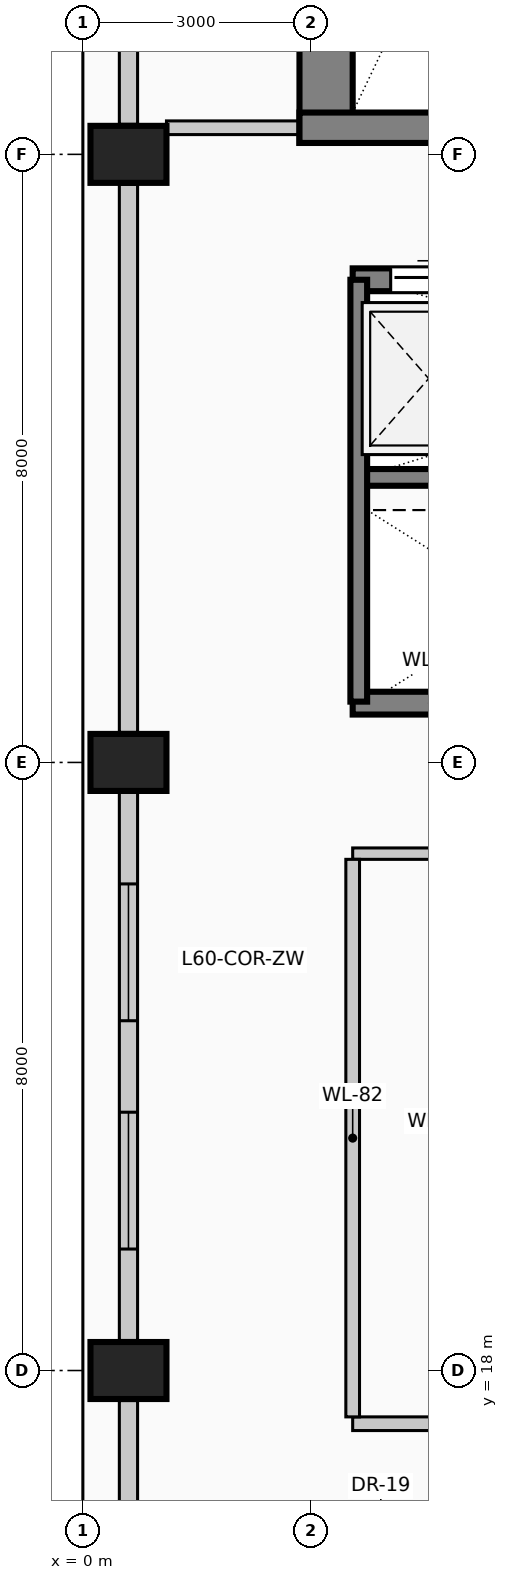
"""IFC4 building model, lengths in metres.
Left out: names, types, materials, properties, quantities, classifications, styles, units other than length and angle.
Written with IfcOpenShell. Run it as: python <this file> out.ifc"""

import sys

from ifc_helpers import new_model, si_unit, direction, frame, frame_2d, origin, origin_2d, place, context, subcontext, project, spatial, rectangle, extrude, element, fill, save


model = new_model("IFC4")
c1 = context("Model", 3, precision=1e-05, world=origin(), true_north=direction((0.0, 1.0)))
c2 = subcontext(c1, "Body", "Model", "MODEL_VIEW")
j1 = project(units=[si_unit("LENGTHUNIT", "METRE"), si_unit("PLANEANGLEUNIT", "RADIAN")], contexts=[c1])
p1 = place(None, origin())
s1 = spatial("IfcSite", under=j1, at=p1, CompositionType="ELEMENT")
p2 = place(p1, origin())
s2 = spatial("IfcBuilding", under=s1, at=p2, CompositionType="ELEMENT")
p3 = place(p2, frame((0.0, 0.0, 248.6)))
s3 = spatial("IfcBuildingStorey", under=s2, at=p3, CompositionType="ELEMENT", Elevation=248.6)
p4 = place(p3, frame((3.2, 34.15, 0.0), z_axis=(0.0, 0.0, 1.0), x_axis=(0.0, 1.0, 0.0)))
e1 = element("IfcWall", 1, at=p4, inside=s3, PredefinedType="SHEAR", context=c2, shape_type="SweptSolid", body=[
    extrude(rectangle(XDim=8.98, YDim=0.7, at=frame_2d((4.49, 0.0))), origin(), (0.0, 0.0, 1.0), 4.0),
])
p5 = place(p3, frame((2.85, 34.35, 0.0), z_axis=(0.0, 0.0, 1.0), x_axis=(1.0, 0.0, 0.0)))
e2 = element("IfcWall", 2, at=p5, inside=s3, PredefinedType="SHEAR", context=c2, shape_type="SweptSolid", body=[
    extrude(rectangle(XDim=4.86, YDim=0.4, at=frame_2d((2.43, 0.0))), origin(), (0.0, 0.0, 1.0), 4.0),
])
p6 = place(p5, frame((2.4, 0.0, 0.0)))
e3 = element("IfcOpeningElement", 3, at=p6, cuts=e2, PredefinedType="OPENING", context=c2, shape_type="SweptSolid", body=[
    extrude(rectangle(XDim=1.15, YDim=2.2, at=frame_2d((0.575, 1.1))), frame((0.0, 0.21, 0.0), z_axis=(0.0, -1.0, 0.0), x_axis=(1.0, 0.0, 0.0)), (0.0, 0.0, 1.0), 0.42),
])
for number, where, z_axis, x_axis in (
    (4, (0.6, 18.0, 0.0), (0.0, 0.0, 1.0), (0.0, 1.0, 0.0)),
    (5, (0.6, 26.0, 0.0), (0.0, 0.0, 1.0), (0.0, 1.0, 0.0)),
    (6, (0.6, 34.0, 0.0), (0.0, 0.0, 1.0), (0.0, 1.0, 0.0)),
):
    element("IfcColumn", number, at=place(p3, frame(where, z_axis=z_axis, x_axis=x_axis)), inside=s3, PredefinedType="COLUMN", context=c2, shape_type="SweptSolid", body=[
        extrude(rectangle(XDim=0.75, YDim=1.0, at=origin_2d()), origin(), (0.0, 0.0, 1.0), 4.0),
    ])
p7 = place(p3, frame((0.6, 10.395, 0.0), z_axis=(0.0, 0.0, 1.0), x_axis=(0.0, 1.0, 0.0)))
e7 = element("IfcWall", 7, at=p7, inside=s3, PredefinedType="SOLIDWALL", context=c2, shape_type="SweptSolid", body=[
    extrude(rectangle(XDim=7.21, YDim=0.24, at=frame_2d((3.605, 0.0))), origin(), (0.0, 0.0, 1.0), 3.0),
])
p8 = place(p7, frame((1.203, 0.0, 0.42)))
e8 = element("IfcOpeningElement", 8, at=p8, cuts=e7, PredefinedType="OPENING", context=c2, shape_type="SweptSolid", body=[
    extrude(rectangle(XDim=1.8, YDim=2.2, at=frame_2d((0.9, 1.1))), frame((0.0, 0.13, 0.0), z_axis=(0.0, -1.0, 0.0), x_axis=(1.0, 0.0, 0.0)), (0.0, 0.0, 1.0), 0.26),
])
p9 = place(p3, frame((0.6, 18.395, 0.0), z_axis=(0.0, 0.0, 1.0), x_axis=(0.0, 1.0, 0.0)))
e9 = element("IfcWall", 9, at=p9, inside=s3, PredefinedType="SOLIDWALL", context=c2, shape_type="SweptSolid", body=[
    extrude(rectangle(XDim=7.21, YDim=0.24, at=frame_2d((3.605, 0.0))), origin(), (0.0, 0.0, 1.0), 3.0),
])
p10 = place(p9, frame((1.203, 0.0, 0.42)))
e10 = element("IfcOpeningElement", 10, at=p10, cuts=e9, PredefinedType="OPENING", context=c2, shape_type="SweptSolid", body=[
    extrude(rectangle(XDim=1.8, YDim=2.2, at=frame_2d((0.9, 1.1))), frame((0.0, 0.13, 0.0), z_axis=(0.0, -1.0, 0.0), x_axis=(1.0, 0.0, 0.0)), (0.0, 0.0, 1.0), 0.26),
])
p11 = place(p9, frame((4.207, 0.0, 0.42)))
e11 = element("IfcOpeningElement", 11, at=p11, cuts=e9, PredefinedType="OPENING", context=c2, shape_type="SweptSolid", body=[
    extrude(rectangle(XDim=1.8, YDim=2.2, at=frame_2d((0.9, 1.1))), frame((0.0, 0.13, 0.0), z_axis=(0.0, -1.0, 0.0), x_axis=(1.0, 0.0, 0.0)), (0.0, 0.0, 1.0), 0.26),
])
p12 = place(p3, frame((0.6, 26.395, 0.0), z_axis=(0.0, 0.0, 1.0), x_axis=(0.0, 1.0, 0.0)))
e12 = element("IfcWall", 12, at=p12, inside=s3, PredefinedType="SOLIDWALL", context=c2, shape_type="SweptSolid", body=[
    extrude(rectangle(XDim=7.21, YDim=0.24, at=frame_2d((3.605, 0.0))), origin(), (0.0, 0.0, 1.0), 3.0),
])
p13 = place(p3, frame((0.6, 34.395, 0.0), z_axis=(0.0, 0.0, 1.0), x_axis=(0.0, 1.0, 0.0)))
e13 = element("IfcWall", 13, at=p13, inside=s3, PredefinedType="SOLIDWALL", context=c2, shape_type="SweptSolid", body=[
    extrude(rectangle(XDim=7.61, YDim=0.24, at=frame_2d((3.805, 0.0))), origin(), (0.0, 0.0, 1.0), 3.0),
])
p14 = place(p3, frame((3.55, 32.35, 0.0), z_axis=(0.0, 0.0, 1.0), x_axis=(1.0, 0.0, 0.0)))
e14 = element("IfcWall", 14, at=p14, inside=s3, PredefinedType="SOLIDWALL", context=c2, shape_type="SweptSolid", body=[
    extrude(rectangle(XDim=2.1, YDim=0.3, at=frame_2d((1.05, 0.0))), origin(), (0.0, 0.0, 1.0), 4.0),
])
p15 = place(p14, frame((0.5, 0.0, 0.0)))
e15 = element("IfcOpeningElement", 15, at=p15, cuts=e14, PredefinedType="OPENING", context=c2, shape_type="SweptSolid", body=[
    extrude(rectangle(XDim=1.1, YDim=2.2, at=frame_2d((0.55, 1.1))), frame((0.0, 0.16, 0.0), z_axis=(0.0, -1.0, 0.0), x_axis=(1.0, 0.0, 0.0)), (0.0, 0.0, 1.0), 0.32),
])
p16 = place(p3, frame((5.65, 26.78, 0.0), z_axis=(0.0, 0.0, 1.0), x_axis=(-1.0, 0.0, 0.0)))
e16 = element("IfcWall", 16, at=p16, inside=s3, PredefinedType="SOLIDWALL", context=c2, shape_type="SweptSolid", body=[
    extrude(rectangle(XDim=2.1, YDim=0.3, at=frame_2d((1.05, 0.0))), origin(), (0.0, 0.0, 1.0), 4.0),
])
p17 = place(p3, frame((3.55, 29.75, 0.0), z_axis=(0.0, 0.0, 1.0), x_axis=(1.0, 0.0, 0.0)))
e17 = element("IfcWall", 17, at=p17, inside=s3, PredefinedType="SOLIDWALL", context=c2, shape_type="SweptSolid", body=[
    extrude(rectangle(XDim=8.65, YDim=0.22, at=frame_2d((4.325, 0.0))), origin(), (0.0, 0.0, 1.0), 4.0),
])
p18 = place(p3, frame((3.63, 26.8, 0.0), z_axis=(0.0, 0.0, 1.0), x_axis=(0.0, 1.0, 0.0)))
e18 = element("IfcWall", 18, at=p18, inside=s3, PredefinedType="SOLIDWALL", context=c2, shape_type="SweptSolid", body=[
    extrude(rectangle(XDim=5.55, YDim=0.22, at=frame_2d((2.775, 0.0))), origin(), (0.0, 0.0, 1.0), 4.0),
])
p19 = place(p3, frame((3.55, 17.3, 0.0), z_axis=(0.0, 0.0, 1.0), x_axis=(1.0, 0.0, 0.0)))
e19 = element("IfcWall", 19, at=p19, inside=s3, PredefinedType="PARTITIONING", context=c2, shape_type="SweptSolid", body=[
    extrude(rectangle(XDim=6.25, YDim=0.18, at=frame_2d((3.125, 0.0))), origin(), (0.0, 0.0, 1.0), 3.75),
])
p20 = place(p19, frame((2.65, 0.0, 0.0)))
e20 = element("IfcOpeningElement", 20, at=p20, cuts=e19, PredefinedType="OPENING", context=c2, shape_type="SweptSolid", body=[
    extrude(rectangle(XDim=0.95, YDim=2.15, at=frame_2d((0.475, 1.075))), frame((0.0, 0.1, 0.0), z_axis=(0.0, -1.0, 0.0), x_axis=(1.0, 0.0, 0.0)), (0.0, 0.0, 1.0), 0.2),
])
p21 = place(p3, frame((3.55, 24.8, 0.0), z_axis=(0.0, 0.0, 1.0), x_axis=(1.0, 0.0, 0.0)))
e21 = element("IfcWall", 21, at=p21, inside=s3, PredefinedType="PARTITIONING", context=c2, shape_type="SweptSolid", body=[
    extrude(rectangle(XDim=6.25, YDim=0.15, at=frame_2d((3.125, 0.0))), origin(), (0.0, 0.0, 1.0), 3.75),
])
p22 = place(p3, frame((1.1, 34.35, 0.0), z_axis=(0.0, 0.0, 1.0), x_axis=(1.0, 0.0, 0.0)))
e22 = element("IfcWall", 22, at=p22, inside=s3, PredefinedType="PARTITIONING", context=c2, shape_type="SweptSolid", body=[
    extrude(rectangle(XDim=1.75, YDim=0.18, at=frame_2d((0.875, 0.0))), origin(), (0.0, 0.0, 1.0), 3.75),
])
p23 = place(p3, frame((3.55, 17.39, 0.0), z_axis=(0.0, 0.0, 1.0), x_axis=(0.0, 1.0, 0.0)))
e23 = element("IfcWall", 23, at=p23, inside=s3, PredefinedType="PARTITIONING", context=c2, shape_type="SweptSolid", body=[
    extrude(rectangle(XDim=7.335, YDim=0.18, at=frame_2d((3.667, 0.0))), origin(), (0.0, 0.0, 1.0), 3.75),
])
p24 = place(p10, origin())
e24 = element("IfcWindow", 24, at=p24, inside=s3, PartitioningType="SINGLE_PANEL", PredefinedType="WINDOW", context=c2, shape_type="SweptSolid", body=[
    extrude(rectangle(XDim=1.8, YDim=2.2, at=frame_2d((0.9, 1.1))), frame((0.0, 0.03, 0.0), z_axis=(0.0, -1.0, 0.0), x_axis=(1.0, 0.0, 0.0)), (0.0, 0.0, 1.0), 0.06),
])
fill(e10, e24)
p25 = place(p11, origin())
e25 = element("IfcWindow", 25, at=p25, inside=s3, PartitioningType="SINGLE_PANEL", PredefinedType="WINDOW", context=c2, shape_type="SweptSolid", body=[
    extrude(rectangle(XDim=1.8, YDim=2.2, at=frame_2d((0.9, 1.1))), frame((0.0, 0.03, 0.0), z_axis=(0.0, -1.0, 0.0), x_axis=(1.0, 0.0, 0.0)), (0.0, 0.0, 1.0), 0.06),
])
fill(e11, e25)
p26 = place(p15, origin())
e26 = element("IfcDoor", 26, at=p26, inside=s3, OperationType="SLIDING_TO_LEFT", PredefinedType="DOOR", context=c2, shape_type="SweptSolid", body=[
    extrude(rectangle(XDim=1.1, YDim=2.2, at=frame_2d((0.55, 1.1))), frame((0.0, 0.025, 0.0), z_axis=(0.0, -1.0, 0.0), x_axis=(1.0, 0.0, 0.0)), (0.0, 0.0, 1.0), 0.05),
])
fill(e15, e26)
save(model, sys.argv[1])
